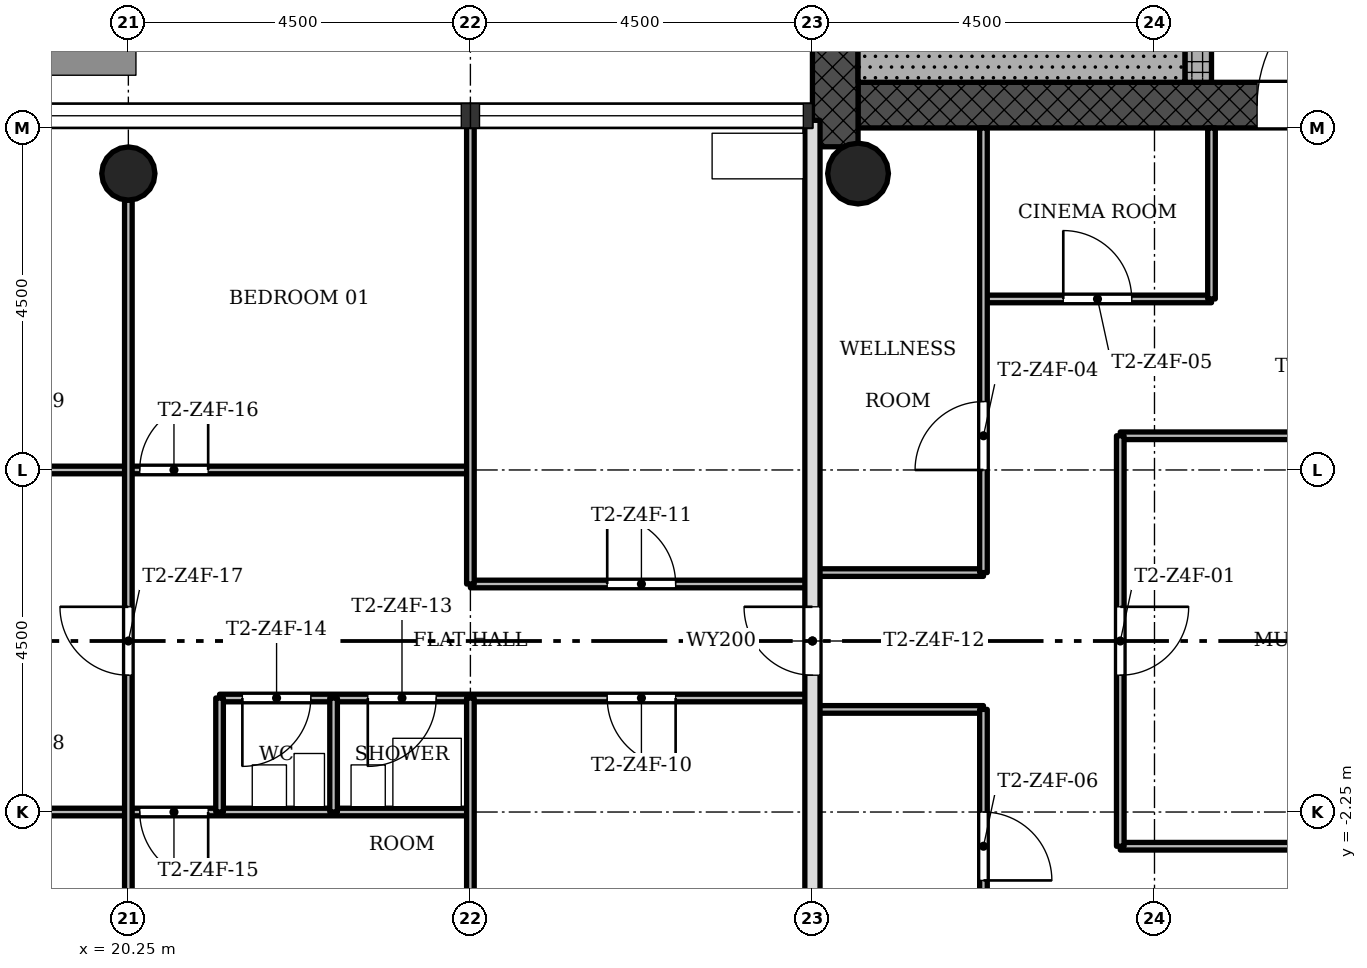
"""IFC4 building model, lengths in metres.
Left out: names, types, materials, properties, quantities, classifications, styles, units other than length and angle.
Written with IfcOpenShell. Run it as: python <this file> out.ifc"""

import sys

from ifc_helpers import new_model, si_unit, direction, frame, frame_2d, origin, origin_2d, place, context, subcontext, project, spatial, rectangle, hollow_circle, extrude, element, fill, save


model = new_model("IFC4")
c1 = context("Model", 3, precision=1e-05, world=origin(), true_north=direction((0.0, 1.0)))
c2 = subcontext(c1, "Body", "Model", "MODEL_VIEW")
j1 = project(units=[si_unit("LENGTHUNIT", "METRE"), si_unit("PLANEANGLEUNIT", "RADIAN")], contexts=[c1])
p1 = place(None, origin())
s1 = spatial("IfcSite", under=j1, at=p1, CompositionType="ELEMENT")
p2 = place(p1, origin())
s2 = spatial("IfcBuilding", under=s1, at=p2, CompositionType="ELEMENT")
p3 = place(p2, frame((0.0, 0.0, 216.4)))
s3 = spatial("IfcBuildingStorey", under=s2, at=p3, CompositionType="ELEMENT", Elevation=216.4)
p4 = place(p3, frame((29.85, 7.05, 0.0), z_axis=(0.0, 0.0, 1.0), x_axis=(1.0, 0.0, 0.0)))
e1 = element("IfcWall", 1, at=p4, inside=s3, PredefinedType="SHEAR", context=c2, shape_type="SweptSolid", body=[
    extrude(rectangle(XDim=12.9, YDim=0.6, at=frame_2d((6.45, 0.0))), origin(), (0.0, 0.0, 1.0), 3.4),
])
p5 = place(p4, frame((5.25, 0.0, 0.0)))
e2 = element("IfcOpeningElement", 2, at=p5, cuts=e1, PredefinedType="OPENING", context=c2, shape_type="SweptSolid", body=[
    extrude(rectangle(XDim=1.8, YDim=2.1, at=frame_2d((0.9, 1.05))), frame((0.0, 0.31, 0.0), z_axis=(0.0, -1.0, 0.0), x_axis=(1.0, 0.0, 0.0)), (0.0, 0.0, 1.0), 0.62),
])
p6 = place(p3, frame((29.55, 15.15, 0.0), z_axis=(0.0, 0.0, 1.0), x_axis=(0.0, -1.0, 0.0)))
e3 = element("IfcWall", 3, at=p6, inside=s3, PredefinedType="SHEAR", context=c2, shape_type="SweptSolid", body=[
    extrude(rectangle(XDim=8.648, YDim=0.6, at=frame_2d((4.324, 0.0))), origin(), (0.0, 0.0, 1.0), 3.4),
])
p7 = place(p3, frame((34.325, 7.35, 0.0), z_axis=(0.0, 0.0, 1.0), x_axis=(0.0, 1.0, 0.0)))
e4 = element("IfcWall", 4, at=p7, inside=s3, PredefinedType="SHEAR", context=c2, shape_type="SweptSolid", body=[
    extrude(rectangle(XDim=7.8, YDim=0.35, at=frame_2d((3.9, 0.0))), origin(), (0.0, 0.0, 1.0), 3.4),
])
p8 = place(p7, frame((1.05, 0.0, 0.0)))
e5 = element("IfcOpeningElement", 5, at=p8, cuts=e4, PredefinedType="OPENING", context=c2, shape_type="SweptSolid", body=[
    extrude(rectangle(XDim=0.9, YDim=2.1, at=frame_2d((0.45, 1.05))), frame((0.0, 0.185, 0.0), z_axis=(0.0, -1.0, 0.0), x_axis=(1.0, 0.0, 0.0)), (0.0, 0.0, 1.0), 0.37),
])
p9 = place(p3, frame((20.25, 6.15, 0.0), z_axis=(0.0, 0.0, 1.0), x_axis=(1.0, 0.0, 0.0)))
e6 = element("IfcColumn", 6, at=p9, inside=s3, PredefinedType="COLUMN", context=c2, shape_type="SweptSolid", body=[
    extrude(hollow_circle(Radius=0.35, WallThickness=0.025, at=origin_2d()), origin(), (0.0, 0.0, 1.0), 3.4),
])
p10 = place(p3, frame((29.85, 6.15, 0.0), z_axis=(0.0, 0.0, 1.0), x_axis=(1.0, 0.0, 0.0)))
e7 = element("IfcColumn", 7, at=p10, inside=s3, PredefinedType="COLUMN", context=c2, shape_type="SweptSolid", body=[
    extrude(hollow_circle(Radius=0.4, WallThickness=0.028, at=origin_2d()), origin(), (0.0, 0.0, 1.0), 3.4),
])
p11 = place(p3, frame((38.7, -2.7, 0.0), z_axis=(0.0, 0.0, 1.0), x_axis=(-1.0, 0.0, 0.0)))
e8 = element("IfcWall", 8, at=p11, inside=s3, PredefinedType="PARTITIONING", context=c2, shape_type="SweptSolid", body=[
    extrude(rectangle(XDim=5.4, YDim=0.1, at=frame_2d((2.7, 0.0))), origin(), (0.0, 0.0, 1.0), 3.0),
])
p12 = place(p3, frame((24.75, -2.25, 0.0), z_axis=(0.0, 0.0, 1.0), x_axis=(-1.0, 0.0, 0.0)))
e9 = element("IfcWall", 9, at=p12, inside=s3, PredefinedType="PARTITIONING", context=c2, shape_type="SweptSolid", body=[
    extrude(rectangle(XDim=9.1, YDim=0.1, at=frame_2d((4.55, 0.0))), origin(), (0.0, 0.0, 1.0), 3.0),
])
p13 = place(p12, frame((3.45, 0.0, 0.0)))
e10 = element("IfcOpeningElement", 10, at=p13, cuts=e9, PredefinedType="OPENING", context=c2, shape_type="SweptSolid", body=[
    extrude(rectangle(XDim=0.9, YDim=2.1, at=frame_2d((0.45, 1.05))), frame((0.0, 0.06, 0.0), z_axis=(0.0, -1.0, 0.0), x_axis=(1.0, 0.0, 0.0)), (0.0, 0.0, 1.0), 0.12),
])
p14 = place(p12, frame((5.55, 0.0, 0.0)))
e11 = element("IfcOpeningElement", 11, at=p14, cuts=e9, PredefinedType="OPENING", context=c2, shape_type="SweptSolid", body=[
    extrude(rectangle(XDim=0.9, YDim=2.1, at=frame_2d((0.45, 1.05))), frame((0.0, 0.06, 0.0), z_axis=(0.0, -1.0, 0.0), x_axis=(1.0, 0.0, 0.0)), (0.0, 0.0, 1.0), 0.12),
])
p15 = place(p3, frame((31.5, -0.9, 0.0), z_axis=(0.0, 0.0, 1.0), x_axis=(-1.0, 0.0, 0.0)))
e12 = element("IfcWall", 12, at=p15, inside=s3, PredefinedType="PARTITIONING", context=c2, shape_type="SweptSolid", body=[
    extrude(rectangle(XDim=2.25, YDim=0.1, at=frame_2d((1.125, 0.0))), origin(), (0.0, 0.0, 1.0), 3.0),
])
p16 = place(p3, frame((29.25, -0.75, 0.0), z_axis=(0.0, 0.0, 1.0), x_axis=(-1.0, 0.0, 0.0)))
e13 = element("IfcWall", 13, at=p16, inside=s3, PredefinedType="PARTITIONING", context=c2, shape_type="SweptSolid", body=[
    extrude(rectangle(XDim=7.8, YDim=0.1, at=frame_2d((3.9, 0.0))), origin(), (0.0, 0.0, 1.0), 3.0),
])
p17 = place(p16, frame((1.8, 0.0, 0.0)))
e14 = element("IfcOpeningElement", 14, at=p17, cuts=e13, PredefinedType="OPENING", context=c2, shape_type="SweptSolid", body=[
    extrude(rectangle(XDim=0.9, YDim=2.1, at=frame_2d((0.45, 1.05))), frame((0.0, 0.06, 0.0), z_axis=(0.0, -1.0, 0.0), x_axis=(1.0, 0.0, 0.0)), (0.0, 0.0, 1.0), 0.12),
])
p18 = place(p16, frame((4.95, 0.0, 0.0)))
e15 = element("IfcOpeningElement", 15, at=p18, cuts=e13, PredefinedType="OPENING", context=c2, shape_type="SweptSolid", body=[
    extrude(rectangle(XDim=0.9, YDim=2.1, at=frame_2d((0.45, 1.05))), frame((0.0, 0.06, 0.0), z_axis=(0.0, -1.0, 0.0), x_axis=(1.0, 0.0, 0.0)), (0.0, 0.0, 1.0), 0.12),
])
p19 = place(p16, frame((6.6, 0.0, 0.0)))
e16 = element("IfcOpeningElement", 16, at=p19, cuts=e13, PredefinedType="OPENING", context=c2, shape_type="SweptSolid", body=[
    extrude(rectangle(XDim=0.9, YDim=2.1, at=frame_2d((0.45, 1.05))), frame((0.0, 0.06, 0.0), z_axis=(0.0, -1.0, 0.0), x_axis=(1.0, 0.0, 0.0)), (0.0, 0.0, 1.0), 0.12),
])
p20 = place(p3, frame((29.25, 0.75, 0.0), z_axis=(0.0, 0.0, 1.0), x_axis=(-1.0, 0.0, 0.0)))
e17 = element("IfcWall", 17, at=p20, inside=s3, PredefinedType="PARTITIONING", context=c2, shape_type="SweptSolid", body=[
    extrude(rectangle(XDim=4.5, YDim=0.1, at=frame_2d((2.25, 0.0))), origin(), (0.0, 0.0, 1.0), 3.0),
])
p21 = place(p20, frame((1.8, 0.0, 0.0)))
e18 = element("IfcOpeningElement", 18, at=p21, cuts=e17, PredefinedType="OPENING", context=c2, shape_type="SweptSolid", body=[
    extrude(rectangle(XDim=0.9, YDim=2.1, at=frame_2d((0.45, 1.05))), frame((0.0, 0.06, 0.0), z_axis=(0.0, -1.0, 0.0), x_axis=(1.0, 0.0, 0.0)), (0.0, 0.0, 1.0), 0.12),
])
p22 = place(p3, frame((31.5, 0.9, 0.0), z_axis=(0.0, 0.0, 1.0), x_axis=(-1.0, 0.0, 0.0)))
e19 = element("IfcWall", 19, at=p22, inside=s3, PredefinedType="PARTITIONING", context=c2, shape_type="SweptSolid", body=[
    extrude(rectangle(XDim=2.25, YDim=0.1, at=frame_2d((1.125, 0.0))), origin(), (0.0, 0.0, 1.0), 3.0),
])
p23 = place(p3, frame((24.75, 2.25, 0.0), z_axis=(0.0, 0.0, 1.0), x_axis=(-1.0, 0.0, 0.0)))
e20 = element("IfcWall", 20, at=p23, inside=s3, PredefinedType="PARTITIONING", context=c2, shape_type="SweptSolid", body=[
    extrude(rectangle(XDim=9.1, YDim=0.1, at=frame_2d((4.55, 0.0))), origin(), (0.0, 0.0, 1.0), 3.0),
])
p24 = place(p23, frame((3.45, 0.0, 0.0)))
e21 = element("IfcOpeningElement", 21, at=p24, cuts=e20, PredefinedType="OPENING", context=c2, shape_type="SweptSolid", body=[
    extrude(rectangle(XDim=0.9, YDim=2.1, at=frame_2d((0.45, 1.05))), frame((0.0, 0.06, 0.0), z_axis=(0.0, -1.0, 0.0), x_axis=(1.0, 0.0, 0.0)), (0.0, 0.0, 1.0), 0.12),
])
p25 = place(p23, frame((5.55, 0.0, 0.0)))
e22 = element("IfcOpeningElement", 22, at=p25, cuts=e20, PredefinedType="OPENING", context=c2, shape_type="SweptSolid", body=[
    extrude(rectangle(XDim=0.9, YDim=2.1, at=frame_2d((0.45, 1.05))), frame((0.0, 0.06, 0.0), z_axis=(0.0, -1.0, 0.0), x_axis=(1.0, 0.0, 0.0)), (0.0, 0.0, 1.0), 0.12),
])
p26 = place(p3, frame((38.7, 2.7, 0.0), z_axis=(0.0, 0.0, 1.0), x_axis=(-1.0, 0.0, 0.0)))
e23 = element("IfcWall", 23, at=p26, inside=s3, PredefinedType="PARTITIONING", context=c2, shape_type="SweptSolid", body=[
    extrude(rectangle(XDim=5.4, YDim=0.1, at=frame_2d((2.7, 0.0))), origin(), (0.0, 0.0, 1.0), 3.0),
])
p27 = place(p26, frame((2.25, 0.0, 0.0)))
e24 = element("IfcOpeningElement", 24, at=p27, cuts=e23, PredefinedType="OPENING", context=c2, shape_type="SweptSolid", body=[
    extrude(rectangle(XDim=0.9, YDim=2.1, at=frame_2d((0.45, 1.05))), frame((0.0, 0.06, 0.0), z_axis=(0.0, -1.0, 0.0), x_axis=(1.0, 0.0, 0.0)), (0.0, 0.0, 1.0), 0.12),
])
p28 = place(p3, frame((34.5, 4.5, 0.0), z_axis=(0.0, 0.0, 1.0), x_axis=(-1.0, 0.0, 0.0)))
e25 = element("IfcWall", 25, at=p28, inside=s3, PredefinedType="PARTITIONING", context=c2, shape_type="SweptSolid", body=[
    extrude(rectangle(XDim=3.0, YDim=0.1, at=frame_2d((1.5, 0.0))), origin(), (0.0, 0.0, 1.0), 3.0),
])
p29 = place(p28, frame((1.05, 0.0, 0.0)))
e26 = element("IfcOpeningElement", 26, at=p29, cuts=e25, PredefinedType="OPENING", context=c2, shape_type="SweptSolid", body=[
    extrude(rectangle(XDim=0.9, YDim=2.1, at=frame_2d((0.45, 1.05))), frame((0.0, 0.06, 0.0), z_axis=(0.0, -1.0, 0.0), x_axis=(1.0, 0.0, 0.0)), (0.0, 0.0, 1.0), 0.12),
])
p30 = place(p3, frame((34.5, 4.5, 0.0), z_axis=(0.0, 0.0, 1.0), x_axis=(0.0, 1.0, 0.0)))
e27 = element("IfcWall", 27, at=p30, inside=s3, PredefinedType="PARTITIONING", context=c2, shape_type="SweptSolid", body=[
    extrude(rectangle(XDim=2.25, YDim=0.1, at=frame_2d((1.125, 0.0))), origin(), (0.0, 0.0, 1.0), 3.0),
])
p31 = place(p3, frame((33.3, -2.7, 0.0), z_axis=(0.0, 0.0, 1.0), x_axis=(0.0, 1.0, 0.0)))
e28 = element("IfcWall", 28, at=p31, inside=s3, PredefinedType="PARTITIONING", context=c2, shape_type="SweptSolid", body=[
    extrude(rectangle(XDim=5.4, YDim=0.1, at=frame_2d((2.7, 0.0))), origin(), (0.0, 0.0, 1.0), 3.0),
])
p32 = place(p31, frame((2.25, 0.0, 0.0)))
e29 = element("IfcOpeningElement", 29, at=p32, cuts=e28, PredefinedType="OPENING", context=c2, shape_type="SweptSolid", body=[
    extrude(rectangle(XDim=0.9, YDim=2.1, at=frame_2d((0.45, 1.05))), frame((0.0, 0.06, 0.0), z_axis=(0.0, -1.0, 0.0), x_axis=(1.0, 0.0, 0.0)), (0.0, 0.0, 1.0), 0.12),
])
p33 = place(p3, frame((31.5, -4.5, 0.0), z_axis=(0.0, 0.0, 1.0), x_axis=(0.0, 1.0, 0.0)))
e30 = element("IfcWall", 30, at=p33, inside=s3, PredefinedType="PARTITIONING", context=c2, shape_type="SweptSolid", body=[
    extrude(rectangle(XDim=3.6, YDim=0.1, at=frame_2d((1.8, 0.0))), origin(), (0.0, 0.0, 1.0), 3.0),
])
p34 = place(p33, frame((1.35, 0.0, 0.0)))
e31 = element("IfcOpeningElement", 31, at=p34, cuts=e30, PredefinedType="OPENING", context=c2, shape_type="SweptSolid", body=[
    extrude(rectangle(XDim=0.9, YDim=2.1, at=frame_2d((0.45, 1.05))), frame((0.0, 0.06, 0.0), z_axis=(0.0, -1.0, 0.0), x_axis=(1.0, 0.0, 0.0)), (0.0, 0.0, 1.0), 0.12),
])
p35 = place(p3, frame((31.5, 0.9, 0.0), z_axis=(0.0, 0.0, 1.0), x_axis=(0.0, 1.0, 0.0)))
e32 = element("IfcWall", 32, at=p35, inside=s3, PredefinedType="PARTITIONING", context=c2, shape_type="SweptSolid", body=[
    extrude(rectangle(XDim=5.85, YDim=0.1, at=frame_2d((2.925, 0.0))), origin(), (0.0, 0.0, 1.0), 3.0),
])
p36 = place(p35, frame((1.35, 0.0, 0.0)))
e33 = element("IfcOpeningElement", 33, at=p36, cuts=e32, PredefinedType="OPENING", context=c2, shape_type="SweptSolid", body=[
    extrude(rectangle(XDim=0.9, YDim=2.1, at=frame_2d((0.45, 1.05))), frame((0.0, 0.06, 0.0), z_axis=(0.0, -1.0, 0.0), x_axis=(1.0, 0.0, 0.0)), (0.0, 0.0, 1.0), 0.12),
])
p37 = place(p3, frame((29.25, -6.85, 0.0), z_axis=(0.0, 0.0, 1.0), x_axis=(0.0, 1.0, 0.0)))
e34 = element("IfcWall", 34, at=p37, inside=s3, PredefinedType="SOLIDWALL", context=c2, shape_type="SweptSolid", body=[
    extrude(rectangle(XDim=13.7, YDim=0.2, at=frame_2d((6.85, 0.0))), origin(), (0.0, 0.0, 1.0), 3.0),
])
p38 = place(p37, frame((6.4, 0.0, 0.0)))
e35 = element("IfcOpeningElement", 35, at=p38, cuts=e34, PredefinedType="OPENING", context=c2, shape_type="SweptSolid", body=[
    extrude(rectangle(XDim=0.9, YDim=2.1, at=frame_2d((0.45, 1.05))), frame((0.0, 0.11, 0.0), z_axis=(0.0, -1.0, 0.0), x_axis=(1.0, 0.0, 0.0)), (0.0, 0.0, 1.0), 0.22),
])
for number, where, z_axis, x_axis in (
    (36, (24.75, -6.85, 0.0), (0.0, 0.0, 1.0), (0.0, 1.0, 0.0)),
    (37, (24.75, 0.75, 0.0), (0.0, 0.0, 1.0), (0.0, 1.0, 0.0)),
):
    element("IfcWall", number, at=place(p3, frame(where, z_axis=z_axis, x_axis=x_axis)), inside=s3, PredefinedType="PARTITIONING", context=c2, shape_type="SweptSolid", body=[
        extrude(rectangle(XDim=6.1, YDim=0.1, at=frame_2d((3.05, 0.0))), origin(), (0.0, 0.0, 1.0), 3.0),
    ])
for number, where, z_axis, x_axis in (
    (38, (22.95, -2.25, 0.0), (0.0, 0.0, 1.0), (0.0, 1.0, 0.0)),
    (39, (21.45, -2.25, 0.0), (0.0, 0.0, 1.0), (0.0, 1.0, 0.0)),
):
    element("IfcWall", number, at=place(p3, frame(where, z_axis=z_axis, x_axis=x_axis)), inside=s3, PredefinedType="PARTITIONING", context=c2, shape_type="SweptSolid", body=[
        extrude(rectangle(XDim=1.5, YDim=0.1, at=frame_2d((0.75, 0.0))), origin(), (0.0, 0.0, 1.0), 3.0),
    ])
p39 = place(p3, frame((20.25, -5.8, 0.0), z_axis=(0.0, 0.0, 1.0), x_axis=(0.0, 1.0, 0.0)))
e40 = element("IfcWall", 40, at=p39, inside=s3, PredefinedType="PARTITIONING", context=c2, shape_type="SweptSolid", body=[
    extrude(rectangle(XDim=11.6, YDim=0.1, at=frame_2d((5.8, 0.0))), origin(), (0.0, 0.0, 1.0), 3.0),
])
p40 = place(p39, frame((5.35, 0.0, 0.0)))
e41 = element("IfcOpeningElement", 41, at=p40, cuts=e40, PredefinedType="OPENING", context=c2, shape_type="SweptSolid", body=[
    extrude(rectangle(XDim=0.9, YDim=2.1, at=frame_2d((0.45, 1.05))), frame((0.0, 0.06, 0.0), z_axis=(0.0, -1.0, 0.0), x_axis=(1.0, 0.0, 0.0)), (0.0, 0.0, 1.0), 0.12),
])
p41 = place(p3, frame((34.15, 7.65, 0.0), z_axis=(0.0, 0.0, 1.0), x_axis=(-1.0, 0.0, 0.0)))
e42 = element("IfcWall", 42, at=p41, inside=s3, PredefinedType="SHEAR", context=c2, shape_type="SweptSolid", body=[
    extrude(rectangle(XDim=4.3, YDim=0.6, at=frame_2d((2.15, 0.0))), origin(), (0.0, 0.0, 1.0), 3.4),
])
p42 = place(p32, origin())
e43 = element("IfcDoor", 43, at=p42, inside=s3, OperationType="SINGLE_SWING_RIGHT", PredefinedType="DOOR", context=c2, shape_type="SweptSolid", body=[
    extrude(rectangle(XDim=0.9, YDim=2.1, at=frame_2d((0.45, 1.05))), frame((0.0, 0.025, 0.0), z_axis=(0.0, -1.0, 0.0), x_axis=(1.0, 0.0, 0.0)), (0.0, 0.0, 1.0), 0.05),
])
fill(e29, e43)
p43 = place(p36, origin())
e44 = element("IfcDoor", 44, at=p43, inside=s3, OperationType="SINGLE_SWING_RIGHT", PredefinedType="DOOR", context=c2, shape_type="SweptSolid", body=[
    extrude(rectangle(XDim=0.9, YDim=2.1, at=frame_2d((0.45, 1.05))), frame((0.0, 0.025, 0.0), z_axis=(0.0, -1.0, 0.0), x_axis=(1.0, 0.0, 0.0)), (0.0, 0.0, 1.0), 0.05),
])
fill(e33, e44)
p44 = place(p29, origin())
e45 = element("IfcDoor", 45, at=p44, inside=s3, OperationType="SINGLE_SWING_RIGHT", PredefinedType="DOOR", context=c2, shape_type="SweptSolid", body=[
    extrude(rectangle(XDim=0.9, YDim=2.1, at=frame_2d((0.45, 1.05))), frame((0.0, 0.025, 0.0), z_axis=(0.0, -1.0, 0.0), x_axis=(1.0, 0.0, 0.0)), (0.0, 0.0, 1.0), 0.05),
])
fill(e26, e45)
p45 = place(p34, origin())
e46 = element("IfcDoor", 46, at=p45, inside=s3, OperationType="SINGLE_SWING_LEFT", PredefinedType="DOOR", context=c2, shape_type="SweptSolid", body=[
    extrude(rectangle(XDim=0.9, YDim=2.1, at=frame_2d((0.45, 1.05))), frame((0.0, 0.025, 0.0), z_axis=(0.0, -1.0, 0.0), x_axis=(1.0, 0.0, 0.0)), (0.0, 0.0, 1.0), 0.05),
])
fill(e31, e46)
p46 = place(p17, origin())
e47 = element("IfcDoor", 47, at=p46, inside=s3, OperationType="SINGLE_SWING_RIGHT", PredefinedType="DOOR", context=c2, shape_type="SweptSolid", body=[
    extrude(rectangle(XDim=0.9, YDim=2.1, at=frame_2d((0.45, 1.05))), frame((0.0, 0.025, 0.0), z_axis=(0.0, -1.0, 0.0), x_axis=(1.0, 0.0, 0.0)), (0.0, 0.0, 1.0), 0.05),
])
fill(e14, e47)
p47 = place(p21, origin())
e48 = element("IfcDoor", 48, at=p47, inside=s3, OperationType="SINGLE_SWING_RIGHT", PredefinedType="DOOR", context=c2, shape_type="SweptSolid", body=[
    extrude(rectangle(XDim=0.9, YDim=2.1, at=frame_2d((0.45, 1.05))), frame((0.0, 0.025, 0.0), z_axis=(0.0, -1.0, 0.0), x_axis=(1.0, 0.0, 0.0)), (0.0, 0.0, 1.0), 0.05),
])
fill(e18, e48)
p48 = place(p38, origin())
e49 = element("IfcDoor", 49, at=p48, inside=s3, OperationType="SINGLE_SWING_LEFT", PredefinedType="DOOR", context=c2, shape_type="SweptSolid", body=[
    extrude(rectangle(XDim=0.9, YDim=2.1, at=frame_2d((0.45, 1.05))), frame((0.0, 0.025, 0.0), z_axis=(0.0, -1.0, 0.0), x_axis=(1.0, 0.0, 0.0)), (0.0, 0.0, 1.0), 0.05),
])
fill(e35, e49)
p49 = place(p18, origin())
e50 = element("IfcDoor", 50, at=p49, inside=s3, OperationType="SINGLE_SWING_LEFT", PredefinedType="DOOR", context=c2, shape_type="SweptSolid", body=[
    extrude(rectangle(XDim=0.9, YDim=2.1, at=frame_2d((0.45, 1.05))), frame((0.0, 0.025, 0.0), z_axis=(0.0, -1.0, 0.0), x_axis=(1.0, 0.0, 0.0)), (0.0, 0.0, 1.0), 0.05),
])
fill(e15, e50)
p50 = place(p19, origin())
e51 = element("IfcDoor", 51, at=p50, inside=s3, OperationType="SINGLE_SWING_LEFT", PredefinedType="DOOR", context=c2, shape_type="SweptSolid", body=[
    extrude(rectangle(XDim=0.9, YDim=2.1, at=frame_2d((0.45, 1.05))), frame((0.0, 0.025, 0.0), z_axis=(0.0, -1.0, 0.0), x_axis=(1.0, 0.0, 0.0)), (0.0, 0.0, 1.0), 0.05),
])
fill(e16, e51)
p51 = place(p13, origin())
e52 = element("IfcDoor", 52, at=p51, inside=s3, OperationType="SINGLE_SWING_RIGHT", PredefinedType="DOOR", context=c2, shape_type="SweptSolid", body=[
    extrude(rectangle(XDim=0.9, YDim=2.1, at=frame_2d((0.45, 1.05))), frame((0.0, 0.025, 0.0), z_axis=(0.0, -1.0, 0.0), x_axis=(1.0, 0.0, 0.0)), (0.0, 0.0, 1.0), 0.05),
])
fill(e10, e52)
p52 = place(p24, origin())
e53 = element("IfcDoor", 53, at=p52, inside=s3, OperationType="SINGLE_SWING_LEFT", PredefinedType="DOOR", context=c2, shape_type="SweptSolid", body=[
    extrude(rectangle(XDim=0.9, YDim=2.1, at=frame_2d((0.45, 1.05))), frame((0.0, 0.025, 0.0), z_axis=(0.0, -1.0, 0.0), x_axis=(1.0, 0.0, 0.0)), (0.0, 0.0, 1.0), 0.05),
])
fill(e21, e53)
p53 = place(p40, origin())
e54 = element("IfcDoor", 54, at=p53, inside=s3, OperationType="SINGLE_SWING_LEFT", PredefinedType="DOOR", context=c2, shape_type="SweptSolid", body=[
    extrude(rectangle(XDim=0.9, YDim=2.1, at=frame_2d((0.45, 1.05))), frame((0.0, 0.025, 0.0), z_axis=(0.0, -1.0, 0.0), x_axis=(1.0, 0.0, 0.0)), (0.0, 0.0, 1.0), 0.05),
])
fill(e41, e54)
p54 = place(p5, origin())
e55 = element("IfcDoor", 55, at=p54, inside=s3, OperationType="SINGLE_SWING_LEFT", PredefinedType="DOOR", context=c2, shape_type="SweptSolid", body=[
    extrude(rectangle(XDim=1.8, YDim=2.1, at=frame_2d((0.9, 1.05))), frame((0.0, 0.025, 0.0), z_axis=(0.0, -1.0, 0.0), x_axis=(1.0, 0.0, 0.0)), (0.0, 0.0, 1.0), 0.05),
])
fill(e2, e55)
save(model, sys.argv[1])
